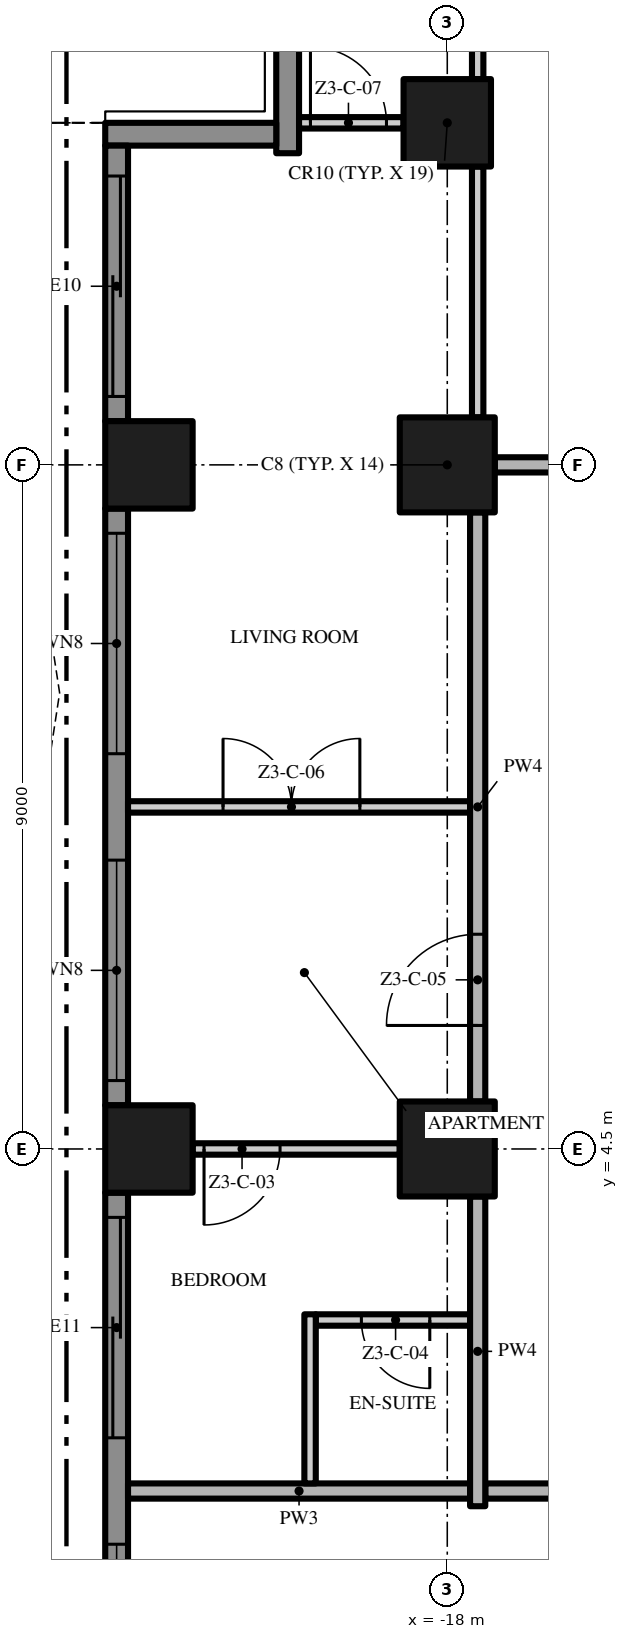
"""IFC4 building model, lengths in metres.
Left out: names, types, materials, properties, quantities, classifications, styles, units other than length and angle.
Written with IfcOpenShell. Run it as: python <this file> out.ifc"""

import sys

from ifc_helpers import new_model, si_unit, direction, frame, frame_2d, origin, origin_2d, place, context, subcontext, project, spatial, polyline, rectangle, outline, extrude, element, fill, save


model = new_model("IFC4")
c1 = context("Model", 3, precision=1e-05, world=origin(), true_north=direction((0.0, 1.0)))
c2 = subcontext(c1, "Body", "Model", "MODEL_VIEW")
j1 = project(units=[si_unit("LENGTHUNIT", "METRE"), si_unit("PLANEANGLEUNIT", "RADIAN")], contexts=[c1])
p1 = place(None, origin())
s1 = spatial("IfcSite", under=j1, at=p1, CompositionType="ELEMENT")
p2 = place(p1, origin())
s2 = spatial("IfcBuilding", under=s1, at=p2, CompositionType="ELEMENT")
p3 = place(p2, frame((0.0, 0.0, 151.6)))
s3 = spatial("IfcBuildingStorey", under=s2, at=p3, CompositionType="ELEMENT", Elevation=151.6)
for number, where, z_axis, x_axis in (
    (1, (-18.0, 13.5, 0.0), (0.0, 0.0, 1.0), (1.0, 0.0, 0.0)),
    (2, (-18.0, 4.5, 0.0), (0.0, 0.0, 1.0), (1.0, 0.0, 0.0)),
):
    element("IfcColumn", number, at=place(p3, frame(where, z_axis=z_axis, x_axis=x_axis)), inside=s3, PredefinedType="COLUMN", context=c2, shape_type="SweptSolid", body=[
        extrude(rectangle(XDim=1.25, YDim=1.25, at=origin_2d()), origin(), (0.0, 0.0, 1.0), 3.5),
    ])
for number, where, z_axis, x_axis in (
    (3, (-21.925, 13.5, 0.0), (0.0, 0.0, 1.0), (1.0, 0.0, 0.0)),
    (4, (-18.0, 18.0, 0.0), (0.0, 0.0, 1.0), (1.0, 0.0, 0.0)),
    (5, (-21.925, 4.5, 0.0), (0.0, 0.0, 1.0), (1.0, 0.0, 0.0)),
):
    element("IfcColumn", number, at=place(p3, frame(where, z_axis=z_axis, x_axis=x_axis)), inside=s3, PredefinedType="COLUMN", context=c2, shape_type="SweptSolid", body=[
        extrude(rectangle(XDim=1.15, YDim=1.15, at=origin_2d()), origin(), (0.0, 0.0, 1.0), 3.5),
    ])
p4 = place(p3, frame((-20.1, 17.6, 0.0), z_axis=(0.0, 0.0, 1.0), x_axis=(0.0, 1.0, 0.0)))
e6 = element("IfcWall", 6, at=p4, inside=s3, PredefinedType="SOLIDWALL", context=c2, shape_type="SweptSolid", body=[
    extrude(rectangle(XDim=2.35, YDim=0.3, at=frame_2d((1.175, 0.0))), origin(), (0.0, 0.0, 1.0), 3.5),
])
p5 = place(p3, frame((-22.5, 17.85, 0.0), z_axis=(0.0, 0.0, 1.0), x_axis=(1.0, 0.0, 0.0)))
e7 = element("IfcWall", 7, at=p5, inside=s3, PredefinedType="SOLIDWALL", context=c2, shape_type="SweptSolid", body=[
    extrude(rectangle(XDim=2.25, YDim=0.3, at=frame_2d((1.125, 0.0))), origin(), (0.0, 0.0, 1.0), 3.5),
])
p6 = place(p3, frame((-22.35, 14.075, 0.0), z_axis=(0.0, 0.0, 1.0), x_axis=(0.0, 1.0, 0.0)))
e8 = element("IfcWall", 8, at=p6, inside=s3, PredefinedType="SOLIDWALL", context=c2, shape_type="SweptSolid", body=[
    extrude(rectangle(XDim=3.625, YDim=0.3, at=frame_2d((1.812, 0.0))), origin(), (0.0, 0.0, 1.0), 3.5),
])
p7 = place(p6, frame((0.325, 0.0, 0.0)))
e9 = element("IfcOpeningElement", 9, at=p7, cuts=e8, PredefinedType="OPENING", context=c2, shape_type="SweptSolid", body=[
    extrude(rectangle(XDim=2.9, YDim=2.4, at=frame_2d((1.45, 1.2))), frame((0.0, 0.16, 0.0), z_axis=(0.0, -1.0, 0.0), x_axis=(1.0, 0.0, 0.0)), (0.0, 0.0, 1.0), 0.32),
])
p8 = place(p3, frame((-22.35, 5.075, 0.0), z_axis=(0.0, 0.0, 1.0), x_axis=(0.0, 1.0, 0.0)))
e10 = element("IfcWall", 10, at=p8, inside=s3, PredefinedType="SOLIDWALL", context=c2, shape_type="SweptSolid", body=[
    extrude(rectangle(XDim=7.85, YDim=0.3, at=frame_2d((3.925, 0.0))), origin(), (0.0, 0.0, 1.0), 3.5),
])
p9 = place(p8, frame((4.625, 0.0, 0.45)))
e11 = element("IfcOpeningElement", 11, at=p9, cuts=e10, PredefinedType="OPENING", context=c2, shape_type="SweptSolid", body=[
    extrude(rectangle(XDim=2.9, YDim=2.65, at=frame_2d((1.45, 1.325))), frame((0.0, 0.16, 0.0), z_axis=(0.0, -1.0, 0.0), x_axis=(1.0, 0.0, 0.0)), (0.0, 0.0, 1.0), 0.32),
])
p10 = place(p8, frame((0.325, 0.0, 0.45)))
e12 = element("IfcOpeningElement", 12, at=p10, cuts=e10, PredefinedType="OPENING", context=c2, shape_type="SweptSolid", body=[
    extrude(rectangle(XDim=2.9, YDim=2.65, at=frame_2d((1.45, 1.325))), frame((0.0, 0.16, 0.0), z_axis=(0.0, -1.0, 0.0), x_axis=(1.0, 0.0, 0.0)), (0.0, 0.0, 1.0), 0.32),
])
p11 = place(p3, frame((-22.35, -3.925, 0.0), z_axis=(0.0, 0.0, 1.0), x_axis=(0.0, 1.0, 0.0)))
e13 = element("IfcWall", 13, at=p11, inside=s3, PredefinedType="SOLIDWALL", context=c2, shape_type="SweptSolid", body=[
    extrude(rectangle(XDim=7.85, YDim=0.3, at=frame_2d((3.925, 0.0))), origin(), (0.0, 0.0, 1.0), 3.5),
])
p12 = place(p11, frame((4.625, 0.0, 0.0)))
e14 = element("IfcOpeningElement", 14, at=p12, cuts=e13, PredefinedType="OPENING", context=c2, shape_type="SweptSolid", body=[
    extrude(rectangle(XDim=2.9, YDim=2.4, at=frame_2d((1.45, 1.2))), frame((0.0, 0.16, 0.0), z_axis=(0.0, -1.0, 0.0), x_axis=(1.0, 0.0, 0.0)), (0.0, 0.0, 1.0), 0.32),
])
p13 = place(p11, frame((0.325, 0.0, 0.45)))
e15 = element("IfcOpeningElement", 15, at=p13, cuts=e13, PredefinedType="OPENING", context=c2, shape_type="SweptSolid", body=[
    extrude(rectangle(XDim=2.9, YDim=2.65, at=frame_2d((1.45, 1.325))), frame((0.0, 0.16, 0.0), z_axis=(0.0, -1.0, 0.0), x_axis=(1.0, 0.0, 0.0)), (0.0, 0.0, 1.0), 0.32),
])
p14 = place(p3, origin())
e16 = element("IfcWall", 16, at=p14, inside=s3, PredefinedType="USERDEFINED", context=c2, shape_type="SweptSolid", body=[
    extrude(outline(polyline([(-25.5, 18.0), (-25.271, 16.5), (-24.671, 15.0), (-23.929, 13.5), (-23.329, 12.0), (-23.1, 10.5), (-23.329, 9.0), (-23.929, 7.5), (-24.671, 6.0), (-25.271, 4.5), (-25.5, 3.0), (-25.271, 1.5), (-24.671, 0.0), (-23.929, -1.5), (-23.329, -3.0), (-23.1, -4.5), (-23.329, -6.0), (-23.929, -7.5), (-24.671, -9.0), (-25.271, -10.5), (-25.5, -12.0), (-25.271, -13.5), (-25.024, -13.462), (-25.247, -12.0), (-25.028, -10.566), (-24.442, -9.102), (-23.701, -7.602), (-23.086, -6.066), (-22.847, -4.5), (-23.086, -2.934), (-23.701, -1.398), (-24.442, 0.102), (-25.028, 1.566), (-25.247, 3.0), (-25.028, 4.434), (-24.442, 5.898), (-23.701, 7.398), (-23.086, 8.934), (-22.847, 10.5), (-23.086, 12.066), (-23.701, 13.602), (-24.442, 15.102), (-25.028, 16.566), (-25.253, 18.038), (-25.5, 18.0)])), origin(), (0.0, 0.0, 1.0), 0.9),
])
p15 = place(p3, frame((17.5, 0.0, 0.0), z_axis=(0.0, 0.0, 1.0), x_axis=(-1.0, 0.0, 0.0)))
e17 = element("IfcWall", 17, at=p15, inside=s3, PredefinedType="PARTITIONING", context=c2, shape_type="SweptSolid", body=[
    extrude(rectangle(XDim=35.0, YDim=0.2, at=frame_2d((17.5, 0.0))), origin(), (0.0, 0.0, 1.0), 3.5),
])
p16 = place(p15, frame((16.75, 0.0, 0.0)))
e18 = element("IfcOpeningElement", 18, at=p16, cuts=e17, PredefinedType="OPENING", context=c2, shape_type="SweptSolid", body=[
    extrude(rectangle(XDim=1.5, YDim=2.4, at=frame_2d((0.75, 1.2))), frame((0.0, 0.11, 0.0), z_axis=(0.0, -1.0, 0.0), x_axis=(1.0, 0.0, 0.0)), (0.0, 0.0, 1.0), 0.22),
])
p17 = place(p3, frame((-22.2, 0.0, 0.0), z_axis=(0.0, 0.0, 1.0), x_axis=(1.0, 0.0, 0.0)))
e19 = element("IfcWall", 19, at=p17, inside=s3, PredefinedType="PARTITIONING", context=c2, shape_type="SweptSolid", body=[
    extrude(rectangle(XDim=4.5, YDim=0.2, at=frame_2d((2.25, 0.0))), origin(), (0.0, 0.0, 1.0), 3.5),
])
p18 = place(p3, frame((-17.7, 2.25, 0.0), z_axis=(0.0, 0.0, 1.0), x_axis=(-1.0, 0.0, 0.0)))
e20 = element("IfcWall", 20, at=p18, inside=s3, PredefinedType="PARTITIONING", context=c2, shape_type="SweptSolid", body=[
    extrude(rectangle(XDim=2.03, YDim=0.15, at=frame_2d((1.015, 0.0))), origin(), (0.0, 0.0, 1.0), 3.5),
])
p19 = place(p18, frame((0.53, 0.0, 0.0)))
e21 = element("IfcOpeningElement", 21, at=p19, cuts=e20, PredefinedType="OPENING", context=c2, shape_type="SweptSolid", body=[
    extrude(rectangle(XDim=0.9, YDim=2.1, at=frame_2d((0.45, 1.05))), frame((0.0, 0.085, 0.0), z_axis=(0.0, -1.0, 0.0), x_axis=(1.0, 0.0, 0.0)), (0.0, 0.0, 1.0), 0.17),
])
p20 = place(p3, frame((-18.625, 4.5, 0.0), z_axis=(0.0, 0.0, 1.0), x_axis=(-1.0, 0.0, 0.0)))
e22 = element("IfcWall", 22, at=p20, inside=s3, PredefinedType="PARTITIONING", context=c2, shape_type="SweptSolid", body=[
    extrude(rectangle(XDim=2.725, YDim=0.15, at=frame_2d((1.363, 0.0))), origin(), (0.0, 0.0, 1.0), 3.5),
])
p21 = place(p20, frame((1.575, 0.0, 0.0)))
e23 = element("IfcOpeningElement", 23, at=p21, cuts=e22, PredefinedType="OPENING", context=c2, shape_type="SweptSolid", body=[
    extrude(rectangle(XDim=1.0, YDim=2.4, at=frame_2d((0.5, 1.2))), frame((0.0, 0.085, 0.0), z_axis=(0.0, -1.0, 0.0), x_axis=(1.0, 0.0, 0.0)), (0.0, 0.0, 1.0), 0.17),
])
p22 = place(p3, frame((-22.2, 9.0, 0.0), z_axis=(0.0, 0.0, 1.0), x_axis=(1.0, 0.0, 0.0)))
e24 = element("IfcWall", 24, at=p22, inside=s3, PredefinedType="PARTITIONING", context=c2, shape_type="SweptSolid", body=[
    extrude(rectangle(XDim=4.5, YDim=0.15, at=frame_2d((2.25, 0.0))), origin(), (0.0, 0.0, 1.0), 3.5),
])
p23 = place(p22, frame((1.25, 0.0, 0.0)))
e25 = element("IfcOpeningElement", 25, at=p23, cuts=e24, PredefinedType="OPENING", context=c2, shape_type="SweptSolid", body=[
    extrude(rectangle(XDim=1.8, YDim=2.4, at=frame_2d((0.9, 1.2))), frame((0.0, 0.085, 0.0), z_axis=(0.0, -1.0, 0.0), x_axis=(1.0, 0.0, 0.0)), (0.0, 0.0, 1.0), 0.17),
])
p24 = place(p3, frame((-17.375, 13.5, 0.0), z_axis=(0.0, 0.0, 1.0), x_axis=(1.0, 0.0, 0.0)))
e26 = element("IfcWall", 26, at=p24, inside=s3, PredefinedType="PARTITIONING", context=c2, shape_type="SweptSolid", body=[
    extrude(rectangle(XDim=3.875, YDim=0.2, at=frame_2d((1.938, 0.0))), origin(), (0.0, 0.0, 1.0), 3.5),
])
p25 = place(p24, frame((1.35, 0.0, 0.0)))
e27 = element("IfcOpeningElement", 27, at=p25, cuts=e26, PredefinedType="OPENING", context=c2, shape_type="SweptSolid", body=[
    extrude(rectangle(XDim=0.9, YDim=2.1, at=frame_2d((0.45, 1.05))), frame((0.0, 0.11, 0.0), z_axis=(0.0, -1.0, 0.0), x_axis=(1.0, 0.0, 0.0)), (0.0, 0.0, 1.0), 0.22),
])
p26 = place(p3, frame((-19.95, 18.0, 0.0), z_axis=(0.0, 0.0, 1.0), x_axis=(1.0, 0.0, 0.0)))
e28 = element("IfcWall", 28, at=p26, inside=s3, PredefinedType="PARTITIONING", context=c2, shape_type="SweptSolid", body=[
    extrude(rectangle(XDim=1.375, YDim=0.15, at=frame_2d((0.688, 0.0))), origin(), (0.0, 0.0, 1.0), 3.5),
])
p27 = place(p26, frame((0.15, 0.0, 0.0)))
e29 = element("IfcOpeningElement", 29, at=p27, cuts=e28, PredefinedType="OPENING", context=c2, shape_type="SweptSolid", body=[
    extrude(rectangle(XDim=1.0, YDim=2.4, at=frame_2d((0.5, 1.2))), frame((0.0, 0.085, 0.0), z_axis=(0.0, -1.0, 0.0), x_axis=(1.0, 0.0, 0.0)), (0.0, 0.0, 1.0), 0.17),
])
p28 = place(p3, frame((-19.805, 0.1, 0.0), z_axis=(0.0, 0.0, 1.0), x_axis=(0.0, 1.0, 0.0)))
e30 = element("IfcWall", 30, at=p28, inside=s3, PredefinedType="PARTITIONING", context=c2, shape_type="SweptSolid", body=[
    extrude(rectangle(XDim=2.225, YDim=0.15, at=frame_2d((1.113, 0.0))), origin(), (0.0, 0.0, 1.0), 3.5),
])
p29 = place(p3, frame((-17.6, -0.2, 0.0), z_axis=(0.0, 0.0, 1.0), x_axis=(0.0, 1.0, 0.0)))
e31 = element("IfcWall", 31, at=p29, inside=s3, PredefinedType="PARTITIONING", context=c2, shape_type="SweptSolid", body=[
    extrude(rectangle(XDim=4.075, YDim=0.2, at=frame_2d((2.038, 0.0))), origin(), (0.0, 0.0, 1.0), 3.5),
])
p30 = place(p3, frame((-17.6, 5.125, 0.0), z_axis=(0.0, 0.0, 1.0), x_axis=(0.0, 1.0, 0.0)))
e32 = element("IfcWall", 32, at=p30, inside=s3, PredefinedType="PARTITIONING", context=c2, shape_type="SweptSolid", body=[
    extrude(rectangle(XDim=7.75, YDim=0.2, at=frame_2d((3.875, 0.0))), origin(), (0.0, 0.0, 1.0), 3.5),
])
p31 = place(p30, frame((1.0, 0.0, 0.0)))
e33 = element("IfcOpeningElement", 33, at=p31, cuts=e32, PredefinedType="OPENING", context=c2, shape_type="SweptSolid", body=[
    extrude(rectangle(XDim=1.2, YDim=2.4, at=frame_2d((0.6, 1.2))), frame((0.0, 0.11, 0.0), z_axis=(0.0, -1.0, 0.0), x_axis=(1.0, 0.0, 0.0)), (0.0, 0.0, 1.0), 0.22),
])
p32 = place(p3, frame((-17.6, 14.125, 0.0), z_axis=(0.0, 0.0, 1.0), x_axis=(0.0, 1.0, 0.0)))
e34 = element("IfcWall", 34, at=p32, inside=s3, PredefinedType="PARTITIONING", context=c2, shape_type="SweptSolid", body=[
    extrude(rectangle(XDim=3.3, YDim=0.15, at=frame_2d((1.65, 0.0))), origin(), (0.0, 0.0, 1.0), 3.5),
])
p33 = place(p3, frame((-17.6, 18.575, 0.0), z_axis=(0.0, 0.0, 1.0), x_axis=(0.0, 1.0, 0.0)))
e35 = element("IfcWall", 35, at=p33, inside=s3, PredefinedType="PARTITIONING", context=c2, shape_type="SweptSolid", body=[
    extrude(rectangle(XDim=2.775, YDim=0.15, at=frame_2d((1.387, 0.0))), origin(), (0.0, 0.0, 1.0), 3.5),
])
p34 = place(p7, origin())
e36 = element("IfcDoor", 36, at=p34, inside=s3, OperationType="SINGLE_SWING_LEFT", PredefinedType="DOOR", context=c2, shape_type="SweptSolid", body=[
    extrude(rectangle(XDim=2.9, YDim=2.4, at=frame_2d((1.45, 1.2))), frame((0.0, 0.025, 0.0), z_axis=(0.0, -1.0, 0.0), x_axis=(1.0, 0.0, 0.0)), (0.0, 0.0, 1.0), 0.05),
])
fill(e9, e36)
p35 = place(p9, origin())
e37 = element("IfcWindow", 37, at=p35, inside=s3, PartitioningType="SINGLE_PANEL", PredefinedType="WINDOW", context=c2, shape_type="SweptSolid", body=[
    extrude(rectangle(XDim=2.9, YDim=2.65, at=frame_2d((1.45, 1.325))), frame((0.0, 0.03, 0.0), z_axis=(0.0, -1.0, 0.0), x_axis=(1.0, 0.0, 0.0)), (0.0, 0.0, 1.0), 0.06),
])
fill(e11, e37)
p36 = place(p10, origin())
e38 = element("IfcWindow", 38, at=p36, inside=s3, PartitioningType="SINGLE_PANEL", PredefinedType="WINDOW", context=c2, shape_type="SweptSolid", body=[
    extrude(rectangle(XDim=2.9, YDim=2.65, at=frame_2d((1.45, 1.325))), frame((0.0, 0.03, 0.0), z_axis=(0.0, -1.0, 0.0), x_axis=(1.0, 0.0, 0.0)), (0.0, 0.0, 1.0), 0.06),
])
fill(e12, e38)
p37 = place(p12, origin())
e39 = element("IfcDoor", 39, at=p37, inside=s3, OperationType="SINGLE_SWING_LEFT", PredefinedType="DOOR", context=c2, shape_type="SweptSolid", body=[
    extrude(rectangle(XDim=2.9, YDim=2.4, at=frame_2d((1.45, 1.2))), frame((0.0, 0.025, 0.0), z_axis=(0.0, -1.0, 0.0), x_axis=(1.0, 0.0, 0.0)), (0.0, 0.0, 1.0), 0.05),
])
fill(e14, e39)
p38 = place(p13, origin())
e40 = element("IfcWindow", 40, at=p38, inside=s3, PartitioningType="SINGLE_PANEL", PredefinedType="WINDOW", context=c2, shape_type="SweptSolid", body=[
    extrude(rectangle(XDim=2.9, YDim=2.65, at=frame_2d((1.45, 1.325))), frame((0.0, 0.03, 0.0), z_axis=(0.0, -1.0, 0.0), x_axis=(1.0, 0.0, 0.0)), (0.0, 0.0, 1.0), 0.06),
])
fill(e15, e40)
p39 = place(p21, origin())
e41 = element("IfcDoor", 41, at=p39, inside=s3, OperationType="SINGLE_SWING_RIGHT", PredefinedType="DOOR", context=c2, shape_type="SweptSolid", body=[
    extrude(rectangle(XDim=1.0, YDim=2.4, at=frame_2d((0.5, 1.2))), frame((0.0, 0.025, 0.0), z_axis=(0.0, -1.0, 0.0), x_axis=(1.0, 0.0, 0.0)), (0.0, 0.0, 1.0), 0.05),
])
fill(e23, e41)
p40 = place(p19, origin())
e42 = element("IfcDoor", 42, at=p40, inside=s3, OperationType="SINGLE_SWING_LEFT", PredefinedType="DOOR", context=c2, shape_type="SweptSolid", body=[
    extrude(rectangle(XDim=0.9, YDim=2.1, at=frame_2d((0.45, 1.05))), frame((0.0, 0.025, 0.0), z_axis=(0.0, -1.0, 0.0), x_axis=(1.0, 0.0, 0.0)), (0.0, 0.0, 1.0), 0.05),
])
fill(e21, e42)
p41 = place(p31, origin())
e43 = element("IfcDoor", 43, at=p41, inside=s3, OperationType="SINGLE_SWING_LEFT", PredefinedType="DOOR", context=c2, shape_type="SweptSolid", body=[
    extrude(rectangle(XDim=1.2, YDim=2.4, at=frame_2d((0.6, 1.2))), frame((0.0, 0.025, 0.0), z_axis=(0.0, -1.0, 0.0), x_axis=(1.0, 0.0, 0.0)), (0.0, 0.0, 1.0), 0.05),
])
fill(e33, e43)
p42 = place(p23, origin())
e44 = element("IfcDoor", 44, at=p42, inside=s3, OperationType="DOUBLE_DOOR_SINGLE_SWING", PredefinedType="DOOR", context=c2, shape_type="SweptSolid", body=[
    extrude(rectangle(XDim=1.8, YDim=2.4, at=frame_2d((0.9, 1.2))), frame((0.0, 0.025, 0.0), z_axis=(0.0, -1.0, 0.0), x_axis=(1.0, 0.0, 0.0)), (0.0, 0.0, 1.0), 0.05),
])
fill(e25, e44)
p43 = place(p27, origin())
e45 = element("IfcDoor", 45, at=p43, inside=s3, OperationType="SINGLE_SWING_LEFT", PredefinedType="DOOR", context=c2, shape_type="SweptSolid", body=[
    extrude(rectangle(XDim=1.0, YDim=2.4, at=frame_2d((0.5, 1.2))), frame((0.0, 0.025, 0.0), z_axis=(0.0, -1.0, 0.0), x_axis=(1.0, 0.0, 0.0)), (0.0, 0.0, 1.0), 0.05),
])
fill(e29, e45)
save(model, sys.argv[1])
